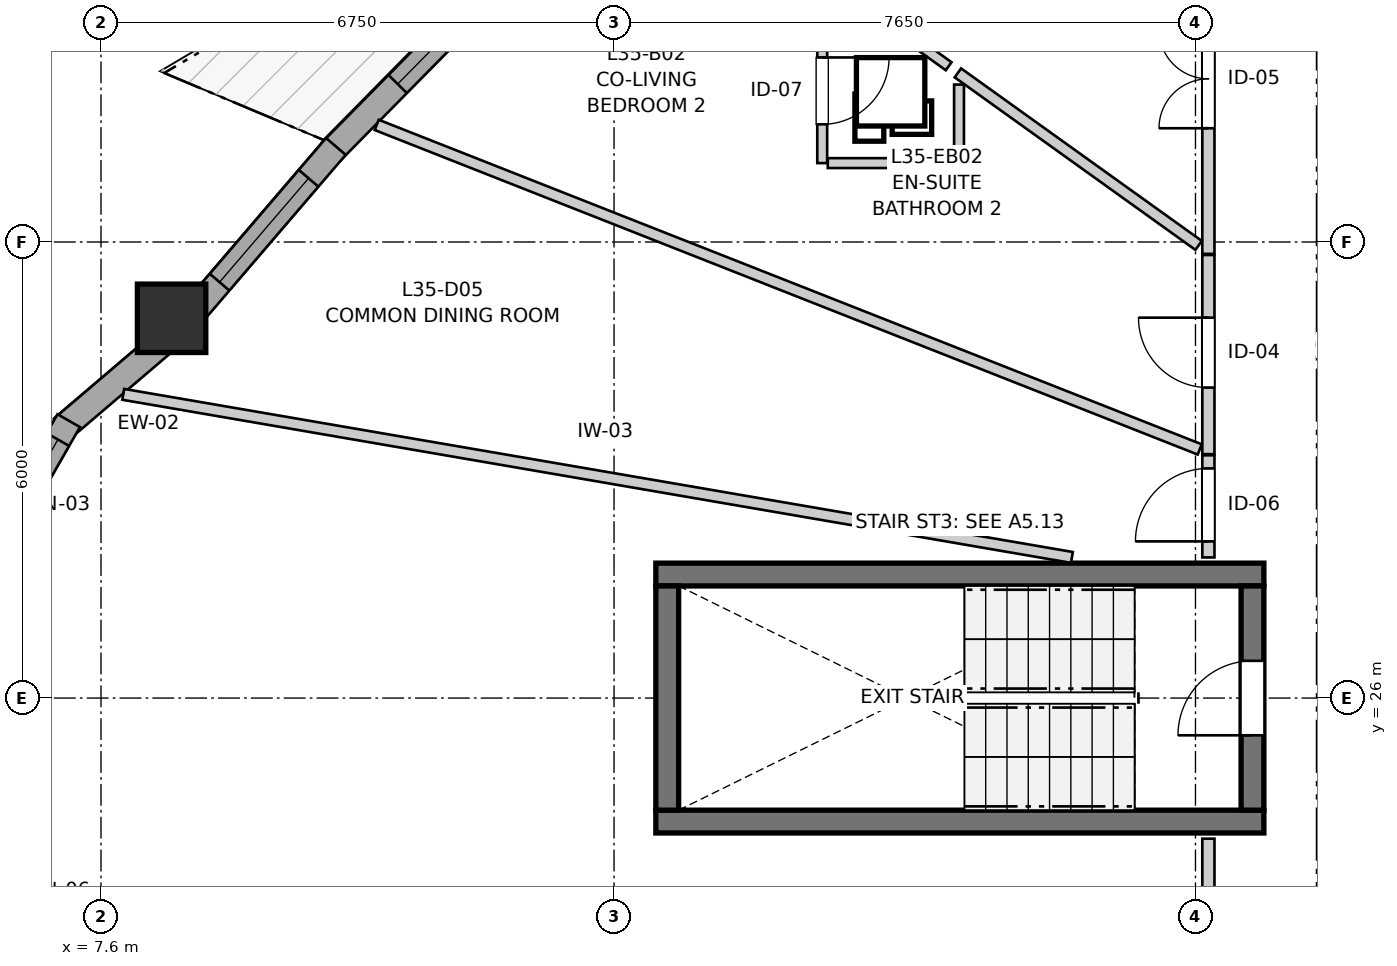
"""IFC4 building model, lengths in metres.
Left out: names, types, materials, properties, quantities, classifications, styles, units other than length and angle.
Written with IfcOpenShell. Run it as: python <this file> out.ifc"""

import sys

from ifc_helpers import new_model, si_unit, direction, frame, frame_2d, origin, origin_2d, place, context, subcontext, project, spatial, rectangle, extrude, source, transform, mapped, element, fill, save


model = new_model("IFC4")
c1 = context("Model", 3, precision=1e-05, world=origin(), true_north=direction((0.0, 1.0)))
c2 = subcontext(c1, "Body", "Model", "MODEL_VIEW")
j1 = project(units=[si_unit("LENGTHUNIT", "METRE"), si_unit("PLANEANGLEUNIT", "RADIAN")], contexts=[c1])
p1 = place(None, origin())
s1 = spatial("IfcSite", under=j1, at=p1, CompositionType="ELEMENT")
p2 = place(p1, origin())
s2 = spatial("IfcBuilding", under=s1, at=p2, CompositionType="ELEMENT")
p3 = place(p2, frame((0.0, 0.0, 118.4)))
s3 = spatial("IfcBuildingStorey", under=s2, at=p3, CompositionType="ELEMENT", Elevation=118.4)
for number, where, z_axis, x_axis in (
    (1, (14.9, 24.375, 0.0), (0.0, 0.0, 1.0), (1.0, 0.0, 0.0)),
    (2, (22.9, 27.625, 0.0), (0.0, 0.0, 1.0), (-1.0, 0.0, 0.0)),
):
    element("IfcWall", number, at=place(p3, frame(where, z_axis=z_axis, x_axis=x_axis)), inside=s3, PredefinedType="SHEAR", context=c2, shape_type="SweptSolid", body=[
        extrude(rectangle(XDim=8.0, YDim=0.3, at=frame_2d((4.0, 0.0))), origin(), (0.0, 0.0, 1.0), 2.95),
    ])
p4 = place(p3, frame((15.05, 27.475, 0.0), z_axis=(0.0, 0.0, 1.0), x_axis=(0.0, -1.0, 0.0)))
e3 = element("IfcWall", 3, at=p4, inside=s3, PredefinedType="SHEAR", context=c2, shape_type="SweptSolid", body=[
    extrude(rectangle(XDim=2.95, YDim=0.3, at=frame_2d((1.475, 0.0))), origin(), (0.0, 0.0, 1.0), 2.95),
])
p5 = place(p3, frame((22.75, 24.525, 0.0), z_axis=(0.0, 0.0, 1.0), x_axis=(0.0, 1.0, 0.0)))
e4 = element("IfcWall", 4, at=p5, inside=s3, PredefinedType="SHEAR", context=c2, shape_type="SweptSolid", body=[
    extrude(rectangle(XDim=2.95, YDim=0.3, at=frame_2d((1.475, 0.0))), origin(), (0.0, 0.0, 1.0), 2.95),
])
p6 = place(p5, frame((0.985, 0.0, 0.0)))
e5 = element("IfcOpeningElement", 5, at=p6, cuts=e4, PredefinedType="OPENING", context=c2, shape_type="SweptSolid", body=[
    extrude(rectangle(XDim=0.98, YDim=2.15, at=frame_2d((0.49, 1.075))), frame((0.0, 0.16, 0.0), z_axis=(0.0, -1.0, 0.0), x_axis=(1.0, 0.0, 0.0)), (0.0, 0.0, 1.0), 0.32),
])
m1 = source(origin(), c2, "Body", "SweptSolid", [
    extrude(rectangle(XDim=0.9, YDim=0.9, at=origin_2d()), origin(), (0.0, 0.0, 1.0), 2.95),
])
p7 = place(p3, frame((8.529, 30.996, 0.0), z_axis=(0.0, 0.0, 1.0), x_axis=(1.0, 0.0, 0.0)))
e6 = element("IfcColumn", 6, at=p7, inside=s3, PredefinedType="COLUMN", context=c2, shape_type="MappedRepresentation", body=[
    mapped(m1, transform((0.0, 0.0, 0.0), x_axis=(1.0, 0.0, 0.0), y_axis=(0.0, 1.0, 0.0), z_axis=(0.0, 0.0, 1.0), scale=1.0)),
])
p8 = place(p3, frame((8.464, 30.718, 0.0), z_axis=(0.0, 0.0, 1.0), x_axis=(-0.76120118347, -0.648515811899, 0.0)))
e7 = element("IfcWall", 7, at=p8, inside=s3, PredefinedType="SOLIDWALL", context=c2, shape_type="SweptSolid", body=[
    extrude(rectangle(XDim=1.805, YDim=0.34, at=frame_2d((0.902, 0.0))), origin(), (0.0, 0.0, 1.0), 2.48),
])
p9 = place(p3, frame((7.175, 29.65, 0.0), z_axis=(0.0, 0.0, 1.0), x_axis=(-0.495999400124, -0.868322863385, 0.0)))
e8 = element("IfcWall", 8, at=p9, inside=s3, PredefinedType="SOLIDWALL", context=c2, shape_type="SweptSolid", body=[
    extrude(rectangle(XDim=2.073, YDim=0.34, at=frame_2d((1.036, 0.0))), origin(), (0.0, 0.0, 1.0), 2.48),
])
p10 = place(p9, frame((0.286, 0.0, 0.82)))
e9 = element("IfcOpeningElement", 9, at=p10, cuts=e8, PredefinedType="OPENING", context=c2, shape_type="SweptSolid", body=[
    extrude(rectangle(XDim=1.5, YDim=1.45, at=frame_2d((0.75, 0.725))), frame((0.0, 0.18, 0.0), z_axis=(0.0, -1.0, 0.0), x_axis=(1.0, 0.0, 0.0)), (0.0, 0.0, 1.0), 0.36),
])
p11 = place(p3, frame((6.147, 24.15, 0.0), z_axis=(0.0, 0.0, 1.0), x_axis=(0.495999400124, -0.868322863385, 0.0)))
e10 = element("IfcWall", 10, at=p11, inside=s3, PredefinedType="SOLIDWALL", context=c2, shape_type="SweptSolid", body=[
    extrude(rectangle(XDim=2.073, YDim=0.34, at=frame_2d((1.036, 0.0))), origin(), (0.0, 0.0, 1.0), 2.48),
])
p12 = place(p11, frame((0.511, 0.0, 0.82)))
e11 = element("IfcOpeningElement", 11, at=p12, cuts=e10, PredefinedType="OPENING", context=c2, shape_type="SweptSolid", body=[
    extrude(rectangle(XDim=1.05, YDim=1.45, at=frame_2d((0.525, 0.725))), frame((0.0, 0.18, 0.0), z_axis=(0.0, -1.0, 0.0), x_axis=(1.0, 0.0, 0.0)), (0.0, 0.0, 1.0), 0.36),
])
p13 = place(p3, frame((12.764, 35.357, 0.0), z_axis=(0.0, 0.0, 1.0), x_axis=(-0.701906045867, -0.712269543625, 0.0)))
e12 = element("IfcWall", 12, at=p13, inside=s3, PredefinedType="SOLIDWALL", context=c2, shape_type="SweptSolid", body=[
    extrude(rectangle(XDim=3.039, YDim=0.34, at=frame_2d((1.52, 0.0))), origin(), (0.0, 0.0, 1.0), 2.48),
])
p14 = place(p13, frame((0.646, 0.0, 0.82)))
e13 = element("IfcOpeningElement", 13, at=p14, cuts=e12, PredefinedType="OPENING", context=c2, shape_type="SweptSolid", body=[
    extrude(rectangle(XDim=1.15, YDim=1.2, at=frame_2d((0.575, 0.6))), frame((0.0, 0.18, 0.0), z_axis=(0.0, -1.0, 0.0), x_axis=(1.0, 0.0, 0.0)), (0.0, 0.0, 1.0), 0.36),
])
p15 = place(p3, frame((10.69, 33.257, 0.0), z_axis=(0.0, 0.0, 1.0), x_axis=(-0.650763576187, -0.759280427714, 0.0)))
e14 = element("IfcWall", 14, at=p15, inside=s3, PredefinedType="SOLIDWALL", context=c2, shape_type="SweptSolid", body=[
    extrude(rectangle(XDim=2.893, YDim=0.34, at=frame_2d((1.447, 0.0))), origin(), (0.0, 0.0, 1.0), 2.48),
])
p16 = place(p15, frame((0.552, 0.0, 0.82)))
e15 = element("IfcOpeningElement", 15, at=p16, cuts=e14, PredefinedType="OPENING", context=c2, shape_type="SweptSolid", body=[
    extrude(rectangle(XDim=1.8, YDim=1.45, at=frame_2d((0.9, 0.725))), frame((0.0, 0.18, 0.0), z_axis=(0.0, -1.0, 0.0), x_axis=(1.0, 0.0, 0.0)), (0.0, 0.0, 1.0), 0.36),
])
p17 = place(p3, frame((22.17, 19.359, 0.0), z_axis=(0.0, 0.0, 1.0), x_axis=(0.0, 1.0, 0.0)))
e16 = element("IfcWall", 16, at=p17, inside=s3, PredefinedType="PARTITIONING", context=c2, shape_type="SweptSolid", body=[
    extrude(rectangle(XDim=4.791, YDim=0.16, at=frame_2d((2.396, 0.0))), origin(), (0.0, 0.0, 1.0), 2.95),
])
p18 = place(p17, frame((1.445, 0.0, 0.0)))
e17 = element("IfcOpeningElement", 17, at=p18, cuts=e16, PredefinedType="OPENING", context=c2, shape_type="SweptSolid", body=[
    extrude(rectangle(XDim=1.3, YDim=2.1, at=frame_2d((0.65, 1.05))), frame((0.0, 0.09, 0.0), z_axis=(0.0, -1.0, 0.0), x_axis=(1.0, 0.0, 0.0)), (0.0, 0.0, 1.0), 0.18),
])
p19 = place(p3, frame((22.17, 31.844, 0.0), z_axis=(0.0, 0.0, 1.0), x_axis=(0.0, 1.0, 0.0)))
e18 = element("IfcWall", 18, at=p19, inside=s3, PredefinedType="PARTITIONING", context=c2, shape_type="SweptSolid", body=[
    extrude(rectangle(XDim=4.586, YDim=0.16, at=frame_2d((2.293, 0.0))), origin(), (0.0, 0.0, 1.0), 2.95),
])
p20 = place(p19, frame((1.653, 0.0, 0.0)))
e19 = element("IfcOpeningElement", 19, at=p20, cuts=e18, PredefinedType="OPENING", context=c2, shape_type="SweptSolid", body=[
    extrude(rectangle(XDim=1.3, YDim=2.1, at=frame_2d((0.65, 1.05))), frame((0.0, 0.09, 0.0), z_axis=(0.0, -1.0, 0.0), x_axis=(1.0, 0.0, 0.0)), (0.0, 0.0, 1.0), 0.18),
])
p21 = place(p3, frame((22.17, 29.209, 0.0), z_axis=(0.0, 0.0, 1.0), x_axis=(0.0, 1.0, 0.0)))
e20 = element("IfcWall", 20, at=p21, inside=s3, PredefinedType="PARTITIONING", context=c2, shape_type="SweptSolid", body=[
    extrude(rectangle(XDim=2.62, YDim=0.16, at=frame_2d((1.31, 0.0))), origin(), (0.0, 0.0, 1.0), 2.95),
])
p22 = place(p21, frame((0.875, 0.0, 0.0)))
e21 = element("IfcOpeningElement", 21, at=p22, cuts=e20, PredefinedType="OPENING", context=c2, shape_type="SweptSolid", body=[
    extrude(rectangle(XDim=0.92, YDim=2.1, at=frame_2d((0.46, 1.05))), frame((0.0, 0.09, 0.0), z_axis=(0.0, -1.0, 0.0), x_axis=(1.0, 0.0, 0.0)), (0.0, 0.0, 1.0), 0.18),
])
p23 = place(p3, frame((17.089, 34.938, 0.0), z_axis=(0.0, 0.0, 1.0), x_axis=(0.0, -1.0, 0.0)))
e22 = element("IfcWall", 22, at=p23, inside=s3, PredefinedType="PARTITIONING", context=c2, shape_type="SweptSolid", body=[
    extrude(rectangle(XDim=1.9, YDim=0.13, at=frame_2d((0.95, 0.0))), origin(), (0.0, 0.0, 1.0), 2.95),
])
p24 = place(p23, frame((0.51, 0.0, 0.0)))
e23 = element("IfcOpeningElement", 23, at=p24, cuts=e22, PredefinedType="OPENING", context=c2, shape_type="SweptSolid", body=[
    extrude(rectangle(XDim=0.88, YDim=2.05, at=frame_2d((0.44, 1.025))), frame((0.0, 0.075, 0.0), z_axis=(0.0, -1.0, 0.0), x_axis=(1.0, 0.0, 0.0)), (0.0, 0.0, 1.0), 0.15),
])
p25 = place(p3, frame((22.17, 27.85, 0.0), z_axis=(0.0, 0.0, 1.0), x_axis=(0.0, 1.0, 0.0)))
e24 = element("IfcWall", 24, at=p25, inside=s3, PredefinedType="PARTITIONING", context=c2, shape_type="SweptSolid", body=[
    extrude(rectangle(XDim=1.344, YDim=0.16, at=frame_2d((0.672, 0.0))), origin(), (0.0, 0.0, 1.0), 2.95),
])
p26 = place(p25, frame((0.211, 0.0, 0.0)))
e25 = element("IfcOpeningElement", 25, at=p26, cuts=e24, PredefinedType="OPENING", context=c2, shape_type="SweptSolid", body=[
    extrude(rectangle(XDim=0.96, YDim=2.1, at=frame_2d((0.48, 1.05))), frame((0.0, 0.09, 0.0), z_axis=(0.0, -1.0, 0.0), x_axis=(1.0, 0.0, 0.0)), (0.0, 0.0, 1.0), 0.18),
])
p27 = place(p3, frame((7.893, 29.996, 0.0), z_axis=(0.0, 0.0, 1.0), x_axis=(0.985544917876, -0.169414328938, 0.0)))
e26 = element("IfcWall", 26, at=p27, inside=s3, PredefinedType="PARTITIONING", context=c2, shape_type="SweptSolid", body=[
    extrude(rectangle(XDim=12.664, YDim=0.145, at=frame_2d((6.332, 0.0))), origin(), (0.0, 0.0, 1.0), 2.95),
])
p28 = place(p3, frame((11.228, 33.54, 0.0), z_axis=(0.0, 0.0, 1.0), x_axis=(0.930301058265, -0.366796866114, 0.0)))
e27 = element("IfcWall", 27, at=p28, inside=s3, PredefinedType="PARTITIONING", context=c2, shape_type="SweptSolid", body=[
    extrude(rectangle(XDim=11.639, YDim=0.145, at=frame_2d((5.82, 0.0))), origin(), (0.0, 0.0, 1.0), 2.95),
])
p29 = place(p3, frame((18.874, 34.225, 0.0), z_axis=(0.0, 0.0, 1.0), x_axis=(0.812826521731, -0.582505833079, 0.0)))
e28 = element("IfcWall", 28, at=p29, inside=s3, PredefinedType="PARTITIONING", context=c2, shape_type="SweptSolid", body=[
    extrude(rectangle(XDim=3.896, YDim=0.145, at=frame_2d((1.948, 0.0))), origin(), (0.0, 0.0, 1.0), 2.95),
])
p30 = place(p3, frame((17.162, 33.038, 0.0), z_axis=(0.0, 0.0, 1.0), x_axis=(1.0, 0.0, 0.0)))
e29 = element("IfcWall", 29, at=p30, inside=s3, PredefinedType="PARTITIONING", context=c2, shape_type="SweptSolid", body=[
    extrude(rectangle(XDim=1.727, YDim=0.13, at=frame_2d((0.863, 0.0))), origin(), (0.0, 0.0, 1.0), 2.95),
])
p31 = place(p3, frame((18.889, 33.111, 0.0), z_axis=(0.0, 0.0, 1.0), x_axis=(0.0, 1.0, 0.0)))
e30 = element("IfcWall", 30, at=p31, inside=s3, PredefinedType="PARTITIONING", context=c2, shape_type="SweptSolid", body=[
    extrude(rectangle(XDim=0.96, YDim=0.13, at=frame_2d((0.48, 0.0))), origin(), (0.0, 0.0, 1.0), 2.95),
])
p32 = place(p3, frame((17.913, 34.914, 0.0), z_axis=(0.0, 0.0, 1.0), x_axis=(0.812774229327, -0.582578794792, 0.0)))
e31 = element("IfcWall", 31, at=p32, inside=s3, PredefinedType="PARTITIONING", context=c2, shape_type="SweptSolid", body=[
    extrude(rectangle(XDim=1.033, YDim=0.13, at=frame_2d((0.517, 0.0))), origin(), (0.0, 0.0, 1.0), 2.95),
])
m2 = source(origin(), c2, "Body", "SweptSolid", [
    extrude(rectangle(XDim=1.5, YDim=1.45, at=frame_2d((0.75, 0.725))), frame((0.0, 0.03, 0.0), z_axis=(0.0, -1.0, 0.0), x_axis=(1.0, 0.0, 0.0)), (0.0, 0.0, 1.0), 0.06),
])
p33 = place(p10, origin())
e32 = element("IfcWindow", 32, at=p33, inside=s3, PartitioningType="SINGLE_PANEL", PredefinedType="WINDOW", context=c2, shape_type="MappedRepresentation", body=[
    mapped(m2, transform((0.0, 0.0, 0.0), x_axis=(1.0, 0.0, 0.0), y_axis=(0.0, 1.0, 0.0), z_axis=(0.0, 0.0, 1.0), scale=1.0)),
])
fill(e9, e32)
m3 = source(origin(), c2, "Body", "SweptSolid", [
    extrude(rectangle(XDim=1.15, YDim=1.2, at=frame_2d((0.575, 0.6))), frame((0.0, 0.03, 0.0), z_axis=(0.0, -1.0, 0.0), x_axis=(1.0, 0.0, 0.0)), (0.0, 0.0, 1.0), 0.06),
])
p34 = place(p14, origin())
e33 = element("IfcWindow", 33, at=p34, inside=s3, PartitioningType="SINGLE_PANEL", PredefinedType="WINDOW", context=c2, shape_type="MappedRepresentation", body=[
    mapped(m3, transform((0.0, 0.0, 0.0), x_axis=(1.0, 0.0, 0.0), y_axis=(0.0, 1.0, 0.0), z_axis=(0.0, 0.0, 1.0), scale=1.0)),
])
fill(e13, e33)
m4 = source(origin(), c2, "Body", "SweptSolid", [
    extrude(rectangle(XDim=1.8, YDim=1.45, at=frame_2d((0.9, 0.725))), frame((0.0, 0.03, 0.0), z_axis=(0.0, -1.0, 0.0), x_axis=(1.0, 0.0, 0.0)), (0.0, 0.0, 1.0), 0.06),
])
p35 = place(p16, origin())
e34 = element("IfcWindow", 34, at=p35, inside=s3, PartitioningType="SINGLE_PANEL", PredefinedType="WINDOW", context=c2, shape_type="MappedRepresentation", body=[
    mapped(m4, transform((0.0, 0.0, 0.0), x_axis=(1.0, 0.0, 0.0), y_axis=(0.0, 1.0, 0.0), z_axis=(0.0, 0.0, 1.0), scale=1.0)),
])
fill(e15, e34)
m5 = source(origin(), c2, "Body", "SweptSolid", [
    extrude(rectangle(XDim=0.98, YDim=2.15, at=frame_2d((0.49, 1.075))), frame((0.0, 0.025, 0.0), z_axis=(0.0, -1.0, 0.0), x_axis=(1.0, 0.0, 0.0)), (0.0, 0.0, 1.0), 0.05),
])
p36 = place(p6, origin())
e35 = element("IfcDoor", 35, at=p36, inside=s3, OperationType="SINGLE_SWING_LEFT", PredefinedType="DOOR", context=c2, shape_type="MappedRepresentation", body=[
    mapped(m5, transform((0.0, 0.0, 0.0), x_axis=(1.0, 0.0, 0.0), y_axis=(0.0, 1.0, 0.0), z_axis=(0.0, 0.0, 1.0), scale=1.0)),
])
fill(e5, e35)
m6 = source(origin(), c2, "Body", "SweptSolid", [
    extrude(rectangle(XDim=1.3, YDim=2.1, at=frame_2d((0.65, 1.05))), frame((0.0, 0.025, 0.0), z_axis=(0.0, -1.0, 0.0), x_axis=(1.0, 0.0, 0.0)), (0.0, 0.0, 1.0), 0.05),
])
p37 = place(p20, origin())
e36 = element("IfcDoor", 36, at=p37, inside=s3, OperationType="DOUBLE_DOOR_SINGLE_SWING", PredefinedType="DOOR", context=c2, shape_type="MappedRepresentation", body=[
    mapped(m6, transform((0.0, 0.0, 0.0), x_axis=(1.0, 0.0, 0.0), y_axis=(0.0, 1.0, 0.0), z_axis=(0.0, 0.0, 1.0), scale=1.0)),
])
fill(e19, e36)
m7 = source(origin(), c2, "Body", "SweptSolid", [
    extrude(rectangle(XDim=0.92, YDim=2.1, at=frame_2d((0.46, 1.05))), frame((0.0, 0.025, 0.0), z_axis=(0.0, -1.0, 0.0), x_axis=(1.0, 0.0, 0.0)), (0.0, 0.0, 1.0), 0.05),
])
p38 = place(p22, origin())
e37 = element("IfcDoor", 37, at=p38, inside=s3, OperationType="SINGLE_SWING_RIGHT", PredefinedType="DOOR", context=c2, shape_type="MappedRepresentation", body=[
    mapped(m7, transform((0.0, 0.0, 0.0), x_axis=(1.0, 0.0, 0.0), y_axis=(0.0, 1.0, 0.0), z_axis=(0.0, 0.0, 1.0), scale=1.0)),
])
fill(e21, e37)
m8 = source(origin(), c2, "Body", "SweptSolid", [
    extrude(rectangle(XDim=0.88, YDim=2.05, at=frame_2d((0.44, 1.025))), frame((0.0, 0.025, 0.0), z_axis=(0.0, -1.0, 0.0), x_axis=(1.0, 0.0, 0.0)), (0.0, 0.0, 1.0), 0.05),
])
p39 = place(p24, origin())
e38 = element("IfcDoor", 38, at=p39, inside=s3, OperationType="SINGLE_SWING_LEFT", PredefinedType="DOOR", context=c2, shape_type="MappedRepresentation", body=[
    mapped(m8, transform((0.0, 0.0, 0.0), x_axis=(1.0, 0.0, 0.0), y_axis=(0.0, 1.0, 0.0), z_axis=(0.0, 0.0, 1.0), scale=1.0)),
])
fill(e23, e38)
m9 = source(origin(), c2, "Body", "SweptSolid", [
    extrude(rectangle(XDim=0.96, YDim=2.1, at=frame_2d((0.48, 1.05))), frame((0.0, 0.025, 0.0), z_axis=(0.0, -1.0, 0.0), x_axis=(1.0, 0.0, 0.0)), (0.0, 0.0, 1.0), 0.05),
])
p40 = place(p26, origin())
e39 = element("IfcDoor", 39, at=p40, inside=s3, OperationType="SINGLE_SWING_LEFT", PredefinedType="DOOR", context=c2, shape_type="MappedRepresentation", body=[
    mapped(m9, transform((0.0, 0.0, 0.0), x_axis=(1.0, 0.0, 0.0), y_axis=(0.0, 1.0, 0.0), z_axis=(0.0, 0.0, 1.0), scale=1.0)),
])
fill(e25, e39)
save(model, sys.argv[1])
